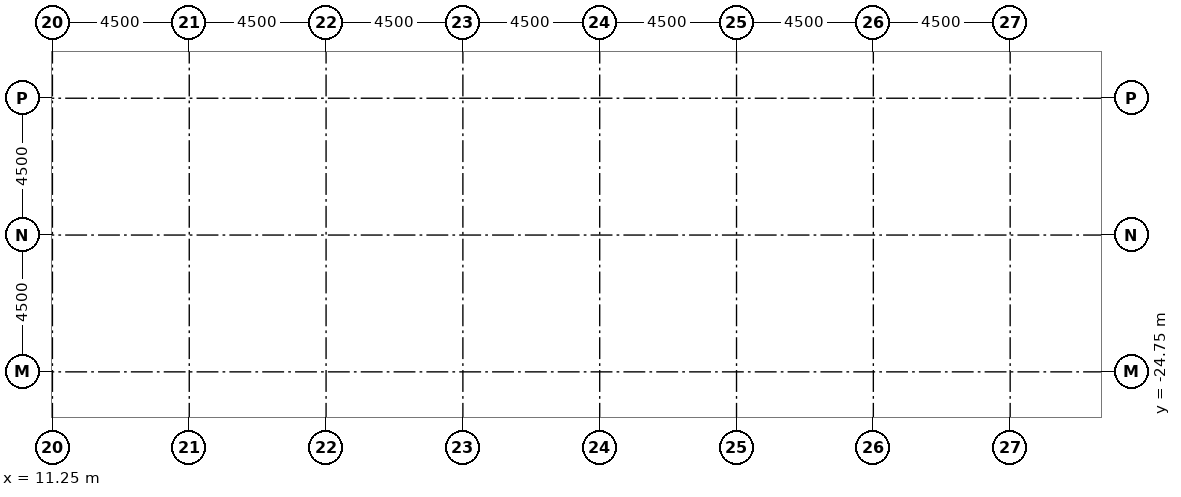
"""IFC4 building model, lengths in metres.
Left out: names, types, materials, properties, quantities, classifications, styles, units other than length and angle.
Written with IfcOpenShell. Run it as: python <this file> out.ifc"""

import sys

from ifc_helpers import new_model, si_unit, direction, frame, origin, origin_2d, place, context, subcontext, project, spatial, rectangle, extrude, element, save


model = new_model("IFC4")
c1 = context("Model", 3, precision=1e-05, world=origin(), true_north=direction((0.0, 1.0)))
c2 = subcontext(c1, "Body", "Model", "MODEL_VIEW")
j1 = project(units=[si_unit("LENGTHUNIT", "METRE"), si_unit("PLANEANGLEUNIT", "RADIAN")], contexts=[c1])
p1 = place(None, origin())
s1 = spatial("IfcSite", under=j1, at=p1, CompositionType="ELEMENT")
p2 = place(p1, origin())
s2 = spatial("IfcBuilding", under=s1, at=p2, CompositionType="ELEMENT")
p3 = place(p2, frame((0.0, 0.0, -8.0)))
s3 = spatial("IfcBuildingStorey", under=s2, at=p3, CompositionType="ELEMENT", Elevation=-8.0)
for number, where, z_axis, x_axis in (
    (1, (22.5, -25.5, 0.0), (0.0, 0.0, 1.0), (1.0, 0.0, 0.0)),
    (2, (31.5, -25.5, 0.0), (0.0, 0.0, 1.0), (1.0, 0.0, 0.0)),
    (3, (40.5, -25.5, 0.0), (0.0, 0.0, 1.0), (1.0, 0.0, 0.0)),
):
    element("IfcColumn", number, at=place(p3, frame(where, z_axis=z_axis, x_axis=x_axis)), inside=s3, PredefinedType="COLUMN", context=c2, shape_type="SweptSolid", body=[
        extrude(rectangle(XDim=1.2, YDim=1.2, at=origin_2d()), origin(), (0.0, 0.0, 1.0), 3.4),
    ])
save(model, sys.argv[1])
